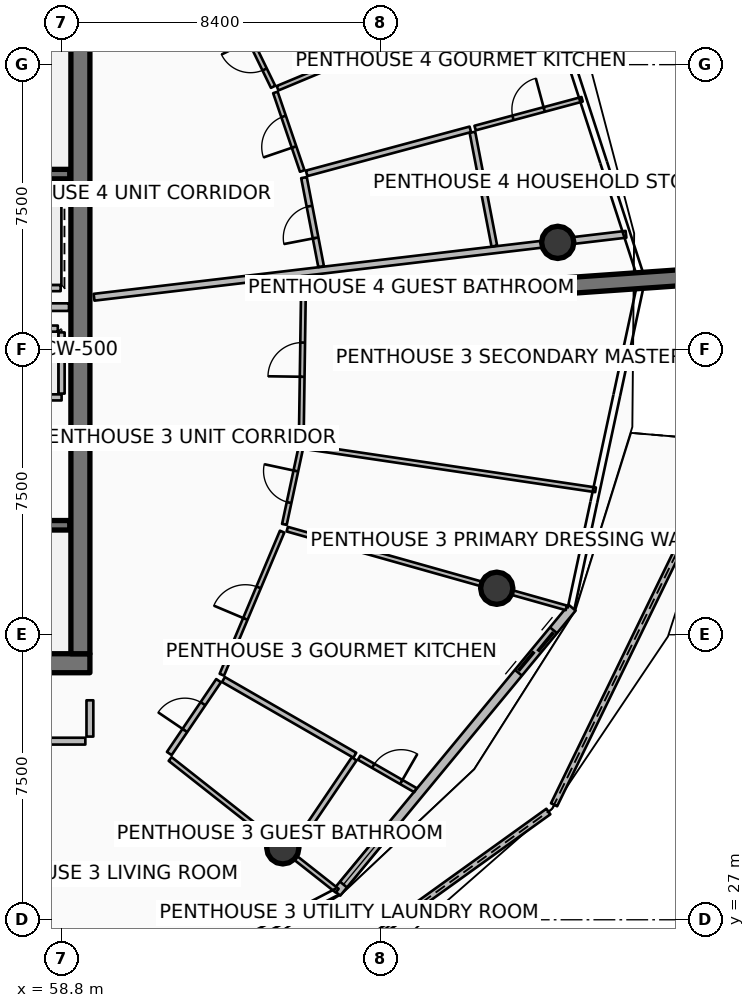
"""IFC4 building model, lengths in metres.
Left out: names, types, materials, properties, quantities, classifications, styles, units other than length and angle.
Written with IfcOpenShell. Run it as: python <this file> out.ifc"""

import sys

from ifc_helpers import new_model, si_unit, direction, frame, frame_2d, origin, origin_2d, place, context, subcontext, project, spatial, polyline, rectangle, circle, outline, extrude, element, fill, save


model = new_model("IFC4")
c1 = context("Model", 3, precision=1e-05, world=origin(), true_north=direction((0.0, 1.0)))
c2 = subcontext(c1, "Body", "Model", "MODEL_VIEW")
j1 = project(units=[si_unit("LENGTHUNIT", "METRE"), si_unit("PLANEANGLEUNIT", "RADIAN")], contexts=[c1])
p1 = place(None, origin())
s1 = spatial("IfcSite", under=j1, at=p1, CompositionType="ELEMENT")
p2 = place(p1, origin())
s2 = spatial("IfcBuilding", under=s1, at=p2, CompositionType="ELEMENT")
p3 = place(p2, frame((0.0, 0.0, 338.9)))
s3 = spatial("IfcBuildingStorey", under=s2, at=p3, CompositionType="ELEMENT", Elevation=338.9)
p4 = place(p3, frame((49.95, 33.75, 0.0), z_axis=(0.0, 0.0, 1.0), x_axis=(1.0, 0.0, 0.0)))
e1 = element("IfcWall", 1, at=p4, inside=s3, PredefinedType="SHEAR", context=c2, shape_type="SweptSolid", body=[
    extrude(rectangle(XDim=9.6, YDim=0.5, at=frame_2d((4.8, 0.0))), origin(), (0.0, 0.0, 1.0), 4.2),
])
p5 = place(p3, frame((59.3, 34.0, 0.0), z_axis=(0.0, 0.0, 1.0), x_axis=(0.0, 1.0, 0.0)))
e2 = element("IfcWall", 2, at=p5, inside=s3, PredefinedType="SHEAR", context=c2, shape_type="SweptSolid", body=[
    extrude(rectangle(XDim=16.0, YDim=0.5, at=frame_2d((8.0, 0.0))), origin(), (0.0, 0.0, 1.0), 4.2),
])
p6 = place(p3, frame((71.941, 43.674, 0.0), z_axis=(0.0, 0.0, 1.0), x_axis=(0.997564163539, 0.069754853754, 0.0)))
e3 = element("IfcWall", 3, at=p6, inside=s3, PredefinedType="SOLIDWALL", context=c2, shape_type="SweptSolid", body=[
    extrude(rectangle(XDim=3.5, YDim=0.42, at=frame_2d((1.75, 0.0))), origin(), (0.0, 0.0, 1.0), 4.2),
])
for number, where, z_axis, x_axis in (
    (4, (64.626, 28.893, 0.0), (0.0, 0.0, 1.0), (1.0, 0.0, 0.0)),
    (5, (70.256, 35.723, 0.0), (0.0, 0.0, 1.0), (1.0, 0.0, 0.0)),
    (6, (71.86, 44.824, 0.0), (0.0, 0.0, 1.0), (1.0, 0.0, 0.0)),
):
    element("IfcColumn", number, at=place(p3, frame(where, z_axis=z_axis, x_axis=x_axis)), inside=s3, PredefinedType="COLUMN", context=c2, shape_type="SweptSolid", body=[
        extrude(circle(Radius=0.425, at=origin_2d()), origin(), (0.0, 0.0, 1.0), 3.8),
    ])
p7 = place(p3, frame((63.531, 24.039, 0.0), z_axis=(0.0, 0.0, 1.0), x_axis=(0.812019730163, 0.583629983659, 0.0)))
e7 = element("IfcWall", 7, at=p7, inside=s3, PredefinedType="PARAPET", context=c2, shape_type="SweptSolid", body=[
    extrude(outline(polyline([(0.0, 0.0), (9.954, 0.0), (9.954, 1.632), (4.977, 1.418), (0.0, 1.233), (0.0, 0.0)])), frame((0.0, 0.09, 0.0), z_axis=(0.0, -1.0, 0.0), x_axis=(1.0, 0.0, 0.0)), (0.0, 0.0, 1.0), 0.18),
])
p8 = place(p3, frame((71.764, 30.026, 0.0), z_axis=(0.0, 0.0, 1.0), x_axis=(0.437628769895, 0.899155748333, 0.0)))
e8 = element("IfcWall", 8, at=p8, inside=s3, PredefinedType="PARAPET", context=c2, shape_type="SweptSolid", body=[
    extrude(outline(polyline([(0.0, 0.0), (10.635, 0.0), (10.635, 1.86), (5.317, 1.798), (0.0, 1.632), (0.0, 0.0)])), frame((0.0, 0.09, 0.0), z_axis=(0.0, -1.0, 0.0), x_axis=(1.0, 0.0, 0.0)), (0.0, 0.0, 1.0), 0.18),
])
p9 = place(p3, frame((66.045, 27.711, 0.0), z_axis=(0.0, 0.0, 1.0), x_axis=(0.636803612721, 0.771026042897, 0.0)))
e9 = element("IfcWall", 9, at=p9, inside=s3, PredefinedType="SOLIDWALL", context=c2, shape_type="SweptSolid", body=[
    extrude(rectangle(XDim=9.728, YDim=0.24, at=frame_2d((4.864, 0.0))), origin(), (0.0, 0.0, 1.0), 2.75),
])
p10 = place(p9, frame((7.508, 0.0, 0.0)))
e10 = element("IfcOpeningElement", 10, at=p10, cuts=e9, PredefinedType="OPENING", context=c2, shape_type="SweptSolid", body=[
    extrude(rectangle(XDim=1.45, YDim=2.15, at=frame_2d((0.725, 1.075))), frame((0.0, 0.13, 0.0), z_axis=(0.0, -1.0, 0.0), x_axis=(1.0, 0.0, 0.0)), (0.0, 0.0, 1.0), 0.26),
])
p11 = place(p9, frame((0.28, 0.0, 0.65)))
e11 = element("IfcOpeningElement", 11, at=p11, cuts=e9, PredefinedType="OPENING", context=c2, shape_type="SweptSolid", body=[
    extrude(rectangle(XDim=1.6, YDim=1.5, at=frame_2d((0.8, 0.75))), frame((0.0, 0.13, 0.0), z_axis=(0.0, -1.0, 0.0), x_axis=(1.0, 0.0, 0.0)), (0.0, 0.0, 1.0), 0.26),
])
p12 = place(p3, frame((51.48, 46.62, 0.0), z_axis=(0.0, 0.0, 1.0), x_axis=(1.0, 0.0, 0.0)))
e12 = element("IfcWall", 12, at=p12, inside=s3, PredefinedType="SOLIDWALL", context=c2, shape_type="SweptSolid", body=[
    extrude(rectangle(XDim=7.54, YDim=0.25, at=frame_2d((3.77, 0.0))), origin(), (0.0, 0.0, 1.0), 3.8),
])
p13 = place(p12, frame((0.3, 0.0, 0.0)))
e13 = element("IfcOpeningElement", 13, at=p13, cuts=e12, PredefinedType="OPENING", context=c2, shape_type="SweptSolid", body=[
    extrude(rectangle(XDim=1.55, YDim=2.15, at=frame_2d((0.775, 1.075))), frame((0.0, 0.135, 0.0), z_axis=(0.0, -1.0, 0.0), x_axis=(1.0, 0.0, 0.0)), (0.0, 0.0, 1.0), 0.27),
])
p14 = place(p3, frame((51.48, 37.38, 0.0), z_axis=(0.0, 0.0, 1.0), x_axis=(1.0, 0.0, 0.0)))
e14 = element("IfcWall", 14, at=p14, inside=s3, PredefinedType="SOLIDWALL", context=c2, shape_type="SweptSolid", body=[
    extrude(rectangle(XDim=7.54, YDim=0.25, at=frame_2d((3.77, 0.0))), origin(), (0.0, 0.0, 1.0), 3.8),
])
p15 = place(p14, frame((0.3, 0.0, 0.0)))
e15 = element("IfcOpeningElement", 15, at=p15, cuts=e14, PredefinedType="OPENING", context=c2, shape_type="SweptSolid", body=[
    extrude(rectangle(XDim=1.55, YDim=2.15, at=frame_2d((0.775, 1.075))), frame((0.0, 0.135, 0.0), z_axis=(0.0, -1.0, 0.0), x_axis=(1.0, 0.0, 0.0)), (0.0, 0.0, 1.0), 0.27),
])
p16 = place(p3, frame((58.805, 40.745, 0.0), z_axis=(0.0, 0.0, 1.0), x_axis=(-1.0, 0.0, 0.0)))
e16 = element("IfcWall", 16, at=p16, inside=s3, PredefinedType="PARTITIONING", context=c2, shape_type="SweptSolid", body=[
    extrude(rectangle(XDim=2.11, YDim=0.16, at=frame_2d((1.055, 0.0))), origin(), (0.0, 0.0, 1.0), 3.8),
])
p17 = place(p16, frame((0.505, 0.0, 0.0)))
e17 = element("IfcOpeningElement", 17, at=p17, cuts=e16, PredefinedType="OPENING", context=c2, shape_type="SweptSolid", body=[
    extrude(rectangle(XDim=1.1, YDim=2.1, at=frame_2d((0.55, 1.05))), frame((0.0, 0.09, 0.0), z_axis=(0.0, -1.0, 0.0), x_axis=(1.0, 0.0, 0.0)), (0.0, 0.0, 1.0), 0.18),
])
p18 = place(p3, frame((58.805, 40.845, 0.0), z_axis=(0.0, 0.0, 1.0), x_axis=(0.0, 1.0, 0.0)))
e18 = element("IfcWall", 18, at=p18, inside=s3, PredefinedType="PARTITIONING", context=c2, shape_type="SweptSolid", body=[
    extrude(rectangle(XDim=1.61, YDim=0.16, at=frame_2d((0.805, 0.0))), origin(), (0.0, 0.0, 1.0), 3.8),
])
p19 = place(p3, frame((56.795, 42.555, 0.0), z_axis=(0.0, 0.0, 1.0), x_axis=(1.0, 0.0, 0.0)))
e19 = element("IfcWall", 19, at=p19, inside=s3, PredefinedType="PARTITIONING", context=c2, shape_type="SweptSolid", body=[
    extrude(rectangle(XDim=1.91, YDim=0.16, at=frame_2d((0.955, 0.0))), origin(), (0.0, 0.0, 1.0), 3.8),
])
for number, where, z_axis, x_axis in (
    (20, (56.72, 46.08, 0.0), (0.0, 0.0, 1.0), (1.0, 0.0, 0.0)),
    (21, (56.72, 43.62, 0.0), (0.0, 0.0, 1.0), (1.0, 0.0, 0.0)),
):
    element("IfcWall", number, at=place(p3, frame(where, z_axis=z_axis, x_axis=x_axis)), inside=s3, PredefinedType="PARTITIONING", context=c2, shape_type="SweptSolid", body=[
        extrude(rectangle(XDim=2.06, YDim=0.16, at=frame_2d((1.03, 0.0))), origin(), (0.0, 0.0, 1.0), 3.8),
    ])
p20 = place(p3, frame((50.12, 43.12, 0.0), z_axis=(0.0, 0.0, 1.0), x_axis=(1.0, 0.0, 0.0)))
e22 = element("IfcWall", 22, at=p20, inside=s3, PredefinedType="PARTITIONING", context=c2, shape_type="SweptSolid", body=[
    extrude(rectangle(XDim=8.88, YDim=0.2, at=frame_2d((4.44, 0.0))), origin(), (0.0, 0.0, 1.0), 3.8),
])
p21 = place(p3, frame((59.659, 43.38, 0.0), z_axis=(0.0, 0.0, 1.0), x_axis=(0.993068307517, 0.117538660041, 0.0)))
e23 = element("IfcWall", 23, at=p21, inside=s3, PredefinedType="PARTITIONING", context=c2, shape_type="SweptSolid", body=[
    extrude(rectangle(XDim=14.095, YDim=0.18, at=frame_2d((7.048, 0.0))), origin(), (0.0, 0.0, 1.0), 3.24),
])
p22 = place(p3, frame((53.888, 31.7, 0.0), z_axis=(0.0, 0.0, 1.0), x_axis=(1.0, 0.0, 0.0)))
e24 = element("IfcWall", 24, at=p22, inside=s3, PredefinedType="PARTITIONING", context=c2, shape_type="SweptSolid", body=[
    extrude(rectangle(XDim=5.542, YDim=0.18, at=frame_2d((2.771, 0.0))), origin(), (0.0, 0.0, 1.0), 3.24),
])
p23 = place(p22, frame((2.221, 0.0, 0.0)))
e25 = element("IfcOpeningElement", 25, at=p23, cuts=e24, PredefinedType="OPENING", context=c2, shape_type="SweptSolid", body=[
    extrude(rectangle(XDim=1.1, YDim=2.1, at=frame_2d((0.55, 1.05))), frame((0.0, 0.1, 0.0), z_axis=(0.0, -1.0, 0.0), x_axis=(1.0, 0.0, 0.0)), (0.0, 0.0, 1.0), 0.2),
])
p24 = place(p3, frame((59.55, 31.82, 0.0), z_axis=(0.0, 0.0, 1.0), x_axis=(0.0, 1.0, 0.0)))
e26 = element("IfcWall", 26, at=p24, inside=s3, PredefinedType="PARTITIONING", context=c2, shape_type="SweptSolid", body=[
    extrude(rectangle(XDim=0.955, YDim=0.18, at=frame_2d((0.477, 0.0))), origin(), (0.0, 0.0, 1.0), 3.24),
])
p25 = place(p3, frame((61.661, 31.23, 0.0), z_axis=(0.0, 0.0, 1.0), x_axis=(0.785321366699, -0.61908832246, 0.0)))
e27 = element("IfcWall", 27, at=p25, inside=s3, PredefinedType="PARTITIONING", context=c2, shape_type="SweptSolid", body=[
    extrude(rectangle(XDim=5.597, YDim=0.125, at=frame_2d((2.799, 0.0))), origin(), (0.0, 0.0, 1.0), 3.24),
])
p26 = place(p3, frame((61.639, 31.375, 0.0), z_axis=(0.0, 0.0, 1.0), x_axis=(0.56062651507, 0.828068783738, 0.0)))
e28 = element("IfcWall", 28, at=p26, inside=s3, PredefinedType="PARTITIONING", context=c2, shape_type="SweptSolid", body=[
    extrude(rectangle(XDim=2.314, YDim=0.15, at=frame_2d((1.157, 0.0))), origin(), (0.0, 0.0, 1.0), 3.24),
])
p27 = place(p26, frame((0.732, 0.0, 0.0)))
e29 = element("IfcOpeningElement", 29, at=p27, cuts=e28, PredefinedType="OPENING", context=c2, shape_type="SweptSolid", body=[
    extrude(rectangle(XDim=0.85, YDim=2.06, at=frame_2d((0.425, 1.03))), frame((0.0, 0.085, 0.0), z_axis=(0.0, -1.0, 0.0), x_axis=(1.0, 0.0, 0.0)), (0.0, 0.0, 1.0), 0.17),
])
p28 = place(p3, frame((64.874, 28.825, 0.0), z_axis=(0.0, 0.0, 1.0), x_axis=(0.560532780406, 0.82813223708, 0.0)))
e30 = element("IfcWall", 30, at=p28, inside=s3, PredefinedType="PARTITIONING", context=c2, shape_type="SweptSolid", body=[
    extrude(rectangle(XDim=2.91, YDim=0.15, at=frame_2d((1.455, 0.0))), origin(), (0.0, 0.0, 1.0), 3.24),
])
p29 = place(p3, frame((63.065, 33.321, 0.0), z_axis=(0.0, 0.0, 1.0), x_axis=(0.866490095299, -0.499194265541, 0.0)))
e31 = element("IfcWall", 31, at=p29, inside=s3, PredefinedType="PARTITIONING", context=c2, shape_type="SweptSolid", body=[
    extrude(rectangle(XDim=3.989, YDim=0.15, at=frame_2d((1.994, 0.0))), origin(), (0.0, 0.0, 1.0), 3.24),
])
p30 = place(p3, frame((66.634, 31.265, 0.0), z_axis=(0.0, 0.0, 1.0), x_axis=(0.866444624685, -0.499273184094, 0.0)))
e32 = element("IfcWall", 32, at=p30, inside=s3, PredefinedType="PARTITIONING", context=c2, shape_type="SweptSolid", body=[
    extrude(rectangle(XDim=1.709, YDim=0.125, at=frame_2d((0.855, 0.0))), origin(), (0.0, 0.0, 1.0), 3.24),
])
p31 = place(p30, frame((0.43, 0.0, 0.0)))
e33 = element("IfcOpeningElement", 33, at=p31, cuts=e32, PredefinedType="OPENING", context=c2, shape_type="SweptSolid", body=[
    extrude(rectangle(XDim=0.85, YDim=2.06, at=frame_2d((0.425, 1.03))), frame((0.0, 0.073, 0.0), z_axis=(0.0, -1.0, 0.0), x_axis=(1.0, 0.0, 0.0)), (0.0, 0.0, 1.0), 0.145),
])
p32 = place(p3, frame((63.021, 33.448, 0.0), z_axis=(0.0, 0.0, 1.0), x_axis=(0.388350881923, 0.921511580236, 0.0)))
e34 = element("IfcWall", 34, at=p32, inside=s3, PredefinedType="PARTITIONING", context=c2, shape_type="SweptSolid", body=[
    extrude(rectangle(XDim=4.085, YDim=0.125, at=frame_2d((2.042, 0.0))), origin(), (0.0, 0.0, 1.0), 3.24),
])
p33 = place(p32, frame((1.593, 0.0, 0.0)))
e35 = element("IfcOpeningElement", 35, at=p33, cuts=e34, PredefinedType="OPENING", context=c2, shape_type="SweptSolid", body=[
    extrude(rectangle(XDim=0.9, YDim=2.08, at=frame_2d((0.45, 1.04))), frame((0.0, 0.073, 0.0), z_axis=(0.0, -1.0, 0.0), x_axis=(1.0, 0.0, 0.0)), (0.0, 0.0, 1.0), 0.145),
])
p34 = place(p3, frame((64.743, 37.278, 0.0), z_axis=(0.0, 0.0, 1.0), x_axis=(0.962455248497, -0.271440407162, 0.0)))
e36 = element("IfcWall", 36, at=p34, inside=s3, PredefinedType="PARTITIONING", context=c2, shape_type="SweptSolid", body=[
    extrude(rectangle(XDim=7.631, YDim=0.125, at=frame_2d((3.815, 0.0))), origin(), (0.0, 0.0, 1.0), 3.24),
])
p35 = place(p3, frame((65.198, 39.449, 0.0), z_axis=(0.0, 0.0, 1.0), x_axis=(0.989175166879, -0.146739528518, 0.0)))
e37 = element("IfcWall", 37, at=p35, inside=s3, PredefinedType="PARTITIONING", context=c2, shape_type="SweptSolid", body=[
    extrude(rectangle(XDim=7.741, YDim=0.125, at=frame_2d((3.871, 0.0))), origin(), (0.0, 0.0, 1.0), 3.24),
])
p36 = place(p3, frame((64.667, 37.403, 0.0), z_axis=(0.0, 0.0, 1.0), x_axis=(0.209586703472, 0.977790066286, 0.0)))
e38 = element("IfcWall", 38, at=p36, inside=s3, PredefinedType="PARTITIONING", context=c2, shape_type="SweptSolid", body=[
    extrude(rectangle(XDim=2.026, YDim=0.125, at=frame_2d((1.013, 0.0))), origin(), (0.0, 0.0, 1.0), 3.24),
])
p37 = place(p36, frame((0.588, 0.0, 0.0)))
e39 = element("IfcOpeningElement", 39, at=p37, cuts=e38, PredefinedType="OPENING", context=c2, shape_type="SweptSolid", body=[
    extrude(rectangle(XDim=0.85, YDim=2.06, at=frame_2d((0.425, 1.03))), frame((0.0, 0.073, 0.0), z_axis=(0.0, -1.0, 0.0), x_axis=(1.0, 0.0, 0.0)), (0.0, 0.0, 1.0), 0.145),
])
p38 = place(p3, frame((65.11, 39.542, 0.0), z_axis=(0.0, 0.0, 1.0), x_axis=(0.014677317906, 0.999892282368, 0.0)))
e40 = element("IfcWall", 40, at=p38, inside=s3, PredefinedType="PARTITIONING", context=c2, shape_type="SweptSolid", body=[
    extrude(rectangle(XDim=4.391, YDim=0.125, at=frame_2d((2.196, 0.0))), origin(), (0.0, 0.0, 1.0), 3.24),
])
p39 = place(p38, frame((1.746, 0.0, 0.0)))
e41 = element("IfcOpeningElement", 41, at=p39, cuts=e40, PredefinedType="OPENING", context=c2, shape_type="SweptSolid", body=[
    extrude(rectangle(XDim=0.9, YDim=2.08, at=frame_2d((0.45, 1.04))), frame((0.0, 0.073, 0.0), z_axis=(0.0, -1.0, 0.0), x_axis=(1.0, 0.0, 0.0)), (0.0, 0.0, 1.0), 0.145),
])
p40 = place(p3, frame((65.634, 44.188, 0.0), z_axis=(0.0, 0.0, 1.0), x_axis=(-0.189079126285, 0.981961854658, 0.0)))
e42 = element("IfcWall", 42, at=p40, inside=s3, PredefinedType="PARTITIONING", context=c2, shape_type="SweptSolid", body=[
    extrude(rectangle(XDim=2.384, YDim=0.15, at=frame_2d((1.192, 0.0))), origin(), (0.0, 0.0, 1.0), 3.24),
])
p41 = place(p40, frame((0.767, 0.0, 0.0)))
e43 = element("IfcOpeningElement", 43, at=p41, cuts=e42, PredefinedType="OPENING", context=c2, shape_type="SweptSolid", body=[
    extrude(rectangle(XDim=0.85, YDim=2.06, at=frame_2d((0.425, 1.03))), frame((0.0, 0.085, 0.0), z_axis=(0.0, -1.0, 0.0), x_axis=(1.0, 0.0, 0.0)), (0.0, 0.0, 1.0), 0.17),
])
p42 = place(p3, frame((70.192, 44.727, 0.0), z_axis=(0.0, 0.0, 1.0), x_axis=(-0.189180095144, 0.981942407477, 0.0)))
e44 = element("IfcWall", 44, at=p42, inside=s3, PredefinedType="PARTITIONING", context=c2, shape_type="SweptSolid", body=[
    extrude(rectangle(XDim=3.048, YDim=0.15, at=frame_2d((1.524, 0.0))), origin(), (0.0, 0.0, 1.0), 3.24),
])
p43 = place(p3, frame((65.253, 46.64, 0.0), z_axis=(0.0, 0.0, 1.0), x_axis=(0.96569498994, 0.259679006477, 0.0)))
e45 = element("IfcWall", 45, at=p43, inside=s3, PredefinedType="PARTITIONING", context=c2, shape_type="SweptSolid", body=[
    extrude(rectangle(XDim=4.46, YDim=0.15, at=frame_2d((2.23, 0.0))), origin(), (0.0, 0.0, 1.0), 3.24),
])
p44 = place(p3, frame((69.686, 47.832, 0.0), z_axis=(0.0, 0.0, 1.0), x_axis=(0.965675542132, 0.259751318242, 0.0)))
e46 = element("IfcWall", 46, at=p44, inside=s3, PredefinedType="PARTITIONING", context=c2, shape_type="SweptSolid", body=[
    extrude(rectangle(XDim=2.917, YDim=0.125, at=frame_2d((1.458, 0.0))), origin(), (0.0, 0.0, 1.0), 3.24),
])
p45 = place(p44, frame((1.033, 0.0, 0.0)))
e47 = element("IfcOpeningElement", 47, at=p45, cuts=e46, PredefinedType="OPENING", context=c2, shape_type="SweptSolid", body=[
    extrude(rectangle(XDim=0.85, YDim=2.06, at=frame_2d((0.425, 1.03))), frame((0.0, 0.073, 0.0), z_axis=(0.0, -1.0, 0.0), x_axis=(1.0, 0.0, 0.0)), (0.0, 0.0, 1.0), 0.145),
])
p46 = place(p3, frame((64.488, 48.88, 0.0), z_axis=(0.0, 0.0, 1.0), x_axis=(0.922882765435, 0.385081032075, 0.0)))
e48 = element("IfcWall", 48, at=p46, inside=s3, PredefinedType="PARTITIONING", context=c2, shape_type="SweptSolid", body=[
    extrude(rectangle(XDim=7.557, YDim=0.125, at=frame_2d((3.778, 0.0))), origin(), (0.0, 0.0, 1.0), 3.24),
])
p47 = place(p3, frame((65.137, 46.702, 0.0), z_axis=(0.0, 0.0, 1.0), x_axis=(-0.323158498211, 0.946344855237, 0.0)))
e49 = element("IfcWall", 49, at=p47, inside=s3, PredefinedType="PARTITIONING", context=c2, shape_type="SweptSolid", body=[
    extrude(rectangle(XDim=2.185, YDim=0.125, at=frame_2d((1.092, 0.0))), origin(), (0.0, 0.0, 1.0), 3.24),
])
p48 = place(p47, frame((0.667, 0.0, 0.0)))
e50 = element("IfcOpeningElement", 50, at=p48, cuts=e49, PredefinedType="OPENING", context=c2, shape_type="SweptSolid", body=[
    extrude(rectangle(XDim=0.85, YDim=2.06, at=frame_2d((0.425, 1.03))), frame((0.0, 0.073, 0.0), z_axis=(0.0, -1.0, 0.0), x_axis=(1.0, 0.0, 0.0)), (0.0, 0.0, 1.0), 0.145),
])
p49 = place(p3, frame((64.37, 48.917, 0.0), z_axis=(0.0, 0.0, 1.0), x_axis=(-0.437562887643, 0.899187810948, 0.0)))
e51 = element("IfcWall", 51, at=p49, inside=s3, PredefinedType="PARTITIONING", context=c2, shape_type="SweptSolid", body=[
    extrude(rectangle(XDim=1.867, YDim=0.125, at=frame_2d((0.934, 0.0))), origin(), (0.0, 0.0, 1.0), 3.24),
])
p50 = place(p49, frame((0.509, 0.0, 0.0)))
e52 = element("IfcOpeningElement", 52, at=p50, cuts=e51, PredefinedType="OPENING", context=c2, shape_type="SweptSolid", body=[
    extrude(rectangle(XDim=0.85, YDim=2.06, at=frame_2d((0.425, 1.03))), frame((0.0, 0.073, 0.0), z_axis=(0.0, -1.0, 0.0), x_axis=(1.0, 0.0, 0.0)), (0.0, 0.0, 1.0), 0.145),
])
p51 = place(p10, origin())
e53 = element("IfcDoor", 53, at=p51, inside=s3, OperationType="DOUBLE_DOOR_SLIDING", PredefinedType="DOOR", context=c2, shape_type="SweptSolid", body=[
    extrude(rectangle(XDim=1.45, YDim=2.15, at=frame_2d((0.725, 1.075))), frame((0.0, 0.025, 0.0), z_axis=(0.0, -1.0, 0.0), x_axis=(1.0, 0.0, 0.0)), (0.0, 0.0, 1.0), 0.05),
])
fill(e10, e53)
p52 = place(p11, origin())
e54 = element("IfcWindow", 54, at=p52, inside=s3, PartitioningType="SINGLE_PANEL", PredefinedType="WINDOW", context=c2, shape_type="SweptSolid", body=[
    extrude(rectangle(XDim=1.6, YDim=1.5, at=frame_2d((0.8, 0.75))), frame((0.0, 0.03, 0.0), z_axis=(0.0, -1.0, 0.0), x_axis=(1.0, 0.0, 0.0)), (0.0, 0.0, 1.0), 0.06),
])
fill(e11, e54)
p53 = place(p27, origin())
e55 = element("IfcDoor", 55, at=p53, inside=s3, OperationType="SINGLE_SWING_LEFT", PredefinedType="DOOR", context=c2, shape_type="SweptSolid", body=[
    extrude(rectangle(XDim=0.85, YDim=2.06, at=frame_2d((0.425, 1.03))), frame((0.0, 0.025, 0.0), z_axis=(0.0, -1.0, 0.0), x_axis=(1.0, 0.0, 0.0)), (0.0, 0.0, 1.0), 0.05),
])
fill(e29, e55)
p54 = place(p31, origin())
e56 = element("IfcDoor", 56, at=p54, inside=s3, OperationType="SINGLE_SWING_RIGHT", PredefinedType="DOOR", context=c2, shape_type="SweptSolid", body=[
    extrude(rectangle(XDim=0.85, YDim=2.06, at=frame_2d((0.425, 1.03))), frame((0.0, 0.025, 0.0), z_axis=(0.0, -1.0, 0.0), x_axis=(1.0, 0.0, 0.0)), (0.0, 0.0, 1.0), 0.05),
])
fill(e33, e56)
p55 = place(p33, origin())
e57 = element("IfcDoor", 57, at=p55, inside=s3, OperationType="SINGLE_SWING_LEFT", PredefinedType="DOOR", context=c2, shape_type="SweptSolid", body=[
    extrude(rectangle(XDim=0.9, YDim=2.08, at=frame_2d((0.45, 1.04))), frame((0.0, 0.025, 0.0), z_axis=(0.0, -1.0, 0.0), x_axis=(1.0, 0.0, 0.0)), (0.0, 0.0, 1.0), 0.05),
])
fill(e35, e57)
p56 = place(p37, origin())
e58 = element("IfcDoor", 58, at=p56, inside=s3, OperationType="SINGLE_SWING_RIGHT", PredefinedType="DOOR", context=c2, shape_type="SweptSolid", body=[
    extrude(rectangle(XDim=0.85, YDim=2.06, at=frame_2d((0.425, 1.03))), frame((0.0, 0.025, 0.0), z_axis=(0.0, -1.0, 0.0), x_axis=(1.0, 0.0, 0.0)), (0.0, 0.0, 1.0), 0.05),
])
fill(e39, e58)
p57 = place(p39, origin())
e59 = element("IfcDoor", 59, at=p57, inside=s3, OperationType="SINGLE_SWING_LEFT", PredefinedType="DOOR", context=c2, shape_type="SweptSolid", body=[
    extrude(rectangle(XDim=0.9, YDim=2.08, at=frame_2d((0.45, 1.04))), frame((0.0, 0.025, 0.0), z_axis=(0.0, -1.0, 0.0), x_axis=(1.0, 0.0, 0.0)), (0.0, 0.0, 1.0), 0.05),
])
fill(e41, e59)
p58 = place(p41, origin())
e60 = element("IfcDoor", 60, at=p58, inside=s3, OperationType="SINGLE_SWING_LEFT", PredefinedType="DOOR", context=c2, shape_type="SweptSolid", body=[
    extrude(rectangle(XDim=0.85, YDim=2.06, at=frame_2d((0.425, 1.03))), frame((0.0, 0.025, 0.0), z_axis=(0.0, -1.0, 0.0), x_axis=(1.0, 0.0, 0.0)), (0.0, 0.0, 1.0), 0.05),
])
fill(e43, e60)
p59 = place(p45, origin())
e61 = element("IfcDoor", 61, at=p59, inside=s3, OperationType="SINGLE_SWING_RIGHT", PredefinedType="DOOR", context=c2, shape_type="SweptSolid", body=[
    extrude(rectangle(XDim=0.85, YDim=2.06, at=frame_2d((0.425, 1.03))), frame((0.0, 0.025, 0.0), z_axis=(0.0, -1.0, 0.0), x_axis=(1.0, 0.0, 0.0)), (0.0, 0.0, 1.0), 0.05),
])
fill(e47, e61)
p60 = place(p48, origin())
e62 = element("IfcDoor", 62, at=p60, inside=s3, OperationType="SINGLE_SWING_LEFT", PredefinedType="DOOR", context=c2, shape_type="SweptSolid", body=[
    extrude(rectangle(XDim=0.85, YDim=2.06, at=frame_2d((0.425, 1.03))), frame((0.0, 0.025, 0.0), z_axis=(0.0, -1.0, 0.0), x_axis=(1.0, 0.0, 0.0)), (0.0, 0.0, 1.0), 0.05),
])
fill(e50, e62)
p61 = place(p50, origin())
e63 = element("IfcDoor", 63, at=p61, inside=s3, OperationType="SINGLE_SWING_RIGHT", PredefinedType="DOOR", context=c2, shape_type="SweptSolid", body=[
    extrude(rectangle(XDim=0.85, YDim=2.06, at=frame_2d((0.425, 1.03))), frame((0.0, 0.025, 0.0), z_axis=(0.0, -1.0, 0.0), x_axis=(1.0, 0.0, 0.0)), (0.0, 0.0, 1.0), 0.05),
])
fill(e52, e63)
save(model, sys.argv[1])
